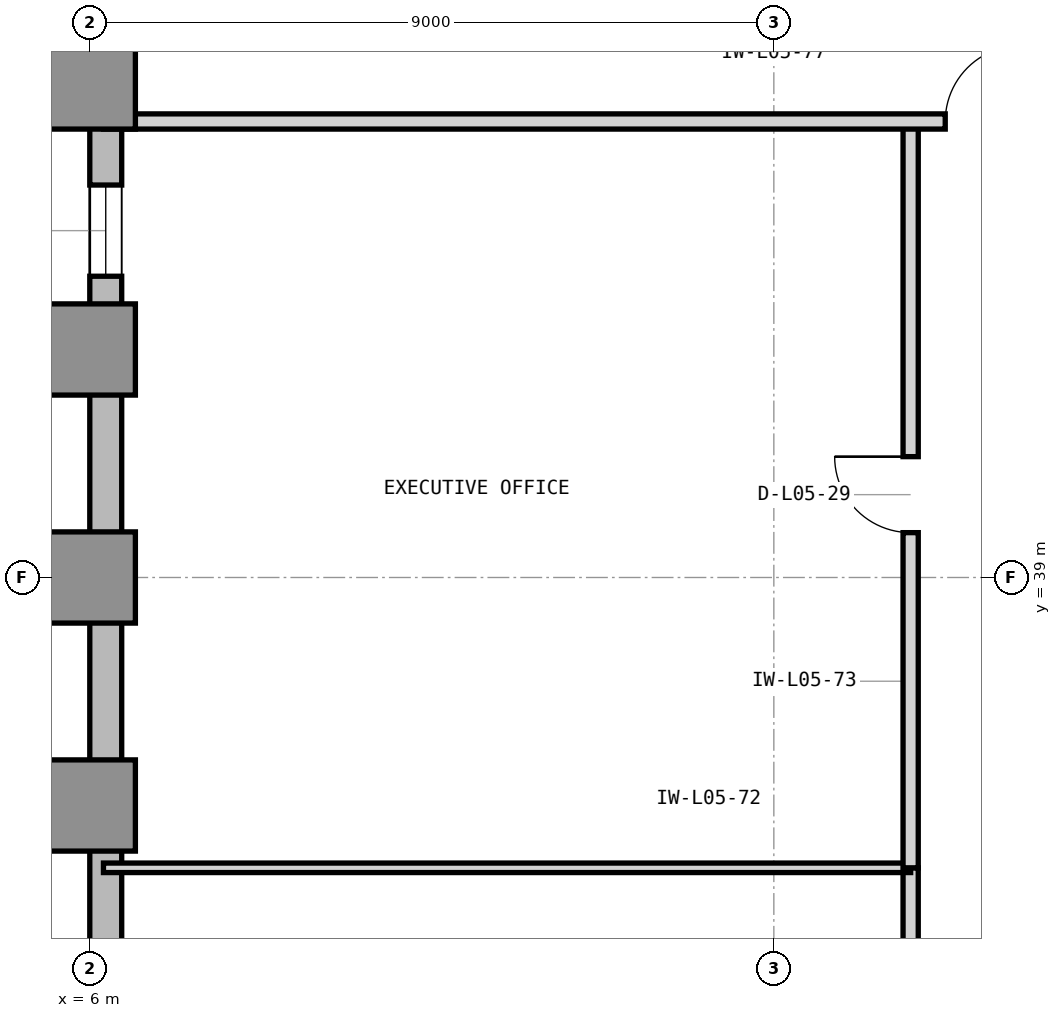
"""IFC4 building model, lengths in metres.
Left out: names, types, materials, properties, quantities, classifications, styles, units other than length and angle.
Written with IfcOpenShell. Run it as: python <this file> out.ifc"""

import sys

from ifc_helpers import new_model, si_unit, direction, frame, frame_2d, origin, origin_2d, place, context, subcontext, project, spatial, rectangle, extrude, element, fill, save


model = new_model("IFC4")
c1 = context("Model", 3, precision=1e-05, world=origin(), true_north=direction((0.0, 1.0)))
c2 = subcontext(c1, "Body", "Model", "MODEL_VIEW")
j1 = project(units=[si_unit("LENGTHUNIT", "METRE"), si_unit("PLANEANGLEUNIT", "RADIAN")], contexts=[c1])
p1 = place(None, origin())
s1 = spatial("IfcSite", under=j1, at=p1, CompositionType="ELEMENT")
p2 = place(p1, origin())
s2 = spatial("IfcBuilding", under=s1, at=p2, CompositionType="ELEMENT")
p3 = place(p2, frame((0.0, 0.0, 25.8)))
s3 = spatial("IfcBuildingStorey", under=s2, at=p3, CompositionType="ELEMENT", Elevation=25.8)
for number, where, z_axis, x_axis in (
    (1, (6.0, 36.0, 0.0), (0.0, 0.0, 1.0), (1.0, 0.0, 0.0)),
    (2, (6.0, 39.0, 0.0), (0.0, 0.0, 1.0), (1.0, 0.0, 0.0)),
    (3, (6.0, 42.0, 0.0), (0.0, 0.0, 1.0), (1.0, 0.0, 0.0)),
    (4, (6.0, 45.5, 0.0), (0.0, 0.0, 1.0), (1.0, 0.0, 0.0)),
):
    element("IfcColumn", number, at=place(p3, frame(where, z_axis=z_axis, x_axis=x_axis)), inside=s3, PredefinedType="COLUMN", context=c2, shape_type="SweptSolid", body=[
        extrude(rectangle(XDim=1.2, YDim=1.2, at=origin_2d()), origin(), (0.0, 0.0, 1.0), 4.2),
    ])
p4 = place(p3, frame((6.21, 49.4, 0.0), z_axis=(0.0, 0.0, 1.0), x_axis=(0.0, -1.0, 0.0)))
e5 = element("IfcWall", 5, at=p4, inside=s3, PredefinedType="STANDARD", context=c2, shape_type="SweptSolid", body=[
    extrude(rectangle(XDim=28.5, YDim=0.42, at=frame_2d((14.25, 0.0))), origin(), (0.0, 0.0, 1.0), 3.98),
])
p5 = place(p4, frame((15.225, 0.0, 0.85)))
e6 = element("IfcOpeningElement", 6, at=p5, cuts=e5, PredefinedType="OPENING", context=c2, shape_type="SweptSolid", body=[
    extrude(rectangle(XDim=2.8, YDim=2.45, at=frame_2d((1.4, 1.225))), frame((0.0, 0.22, 0.0), z_axis=(0.0, -1.0, 0.0), x_axis=(1.0, 0.0, 0.0)), (0.0, 0.0, 1.0), 0.44),
])
p6 = place(p4, frame((5.236, 0.0, 0.85)))
e7 = element("IfcOpeningElement", 7, at=p6, cuts=e5, PredefinedType="OPENING", context=c2, shape_type="SweptSolid", body=[
    extrude(rectangle(XDim=1.2, YDim=2.45, at=frame_2d((0.6, 1.225))), frame((0.0, 0.22, 0.0), z_axis=(0.0, -1.0, 0.0), x_axis=(1.0, 0.0, 0.0)), (0.0, 0.0, 1.0), 0.44),
])
p7 = place(p3, frame((16.8, 29.18, 0.0), z_axis=(0.0, 0.0, 1.0), x_axis=(0.0, 1.0, 0.0)))
e8 = element("IfcWall", 8, at=p7, inside=s3, PredefinedType="PARTITIONING", context=c2, shape_type="SweptSolid", body=[
    extrude(rectangle(XDim=6.0, YDim=0.2, at=frame_2d((3.0, 0.0))), origin(), (0.0, 0.0, 1.0), 3.97),
])
p8 = place(p7, frame((2.5, 0.0, 0.0)))
e9 = element("IfcOpeningElement", 9, at=p8, cuts=e8, PredefinedType="OPENING", context=c2, shape_type="SweptSolid", body=[
    extrude(rectangle(XDim=1.0, YDim=2.15, at=frame_2d((0.5, 1.075))), frame((0.0, 0.11, 0.0), z_axis=(0.0, -1.0, 0.0), x_axis=(1.0, 0.0, 0.0)), (0.0, 0.0, 1.0), 0.22),
])
p9 = place(p3, frame((6.18, 35.18, 0.0), z_axis=(0.0, 0.0, 1.0), x_axis=(1.0, 0.0, 0.0)))
e10 = element("IfcWall", 10, at=p9, inside=s3, PredefinedType="PARTITIONING", context=c2, shape_type="SweptSolid", body=[
    extrude(rectangle(XDim=10.62, YDim=0.125, at=frame_2d((5.31, 0.0))), origin(), (0.0, 0.0, 1.0), 3.97),
])
p10 = place(p3, frame((16.8, 35.18, 0.0), z_axis=(0.0, 0.0, 1.0), x_axis=(0.0, 1.0, 0.0)))
e11 = element("IfcWall", 11, at=p10, inside=s3, PredefinedType="PARTITIONING", context=c2, shape_type="SweptSolid", body=[
    extrude(rectangle(XDim=9.82, YDim=0.2, at=frame_2d((4.91, 0.0))), origin(), (0.0, 0.0, 1.0), 3.97),
])
p11 = place(p10, frame((4.41, 0.0, 0.0)))
e12 = element("IfcOpeningElement", 12, at=p11, cuts=e11, PredefinedType="OPENING", context=c2, shape_type="SweptSolid", body=[
    extrude(rectangle(XDim=1.0, YDim=2.15, at=frame_2d((0.5, 1.075))), frame((0.0, 0.11, 0.0), z_axis=(0.0, -1.0, 0.0), x_axis=(1.0, 0.0, 0.0)), (0.0, 0.0, 1.0), 0.22),
])
p12 = place(p3, frame((6.18, 45.0, 0.0), z_axis=(0.0, 0.0, 1.0), x_axis=(1.0, 0.0, 0.0)))
e13 = element("IfcWall", 13, at=p12, inside=s3, PredefinedType="PARTITIONING", context=c2, shape_type="SweptSolid", body=[
    extrude(rectangle(XDim=17.64, YDim=0.2, at=frame_2d((8.82, 0.0))), origin(), (0.0, 0.0, 1.0), 3.97),
])
p13 = place(p12, frame((11.075, 0.0, 0.0)))
e14 = element("IfcOpeningElement", 14, at=p13, cuts=e13, PredefinedType="OPENING", context=c2, shape_type="SweptSolid", body=[
    extrude(rectangle(XDim=1.0, YDim=2.15, at=frame_2d((0.5, 1.075))), frame((0.0, 0.11, 0.0), z_axis=(0.0, -1.0, 0.0), x_axis=(1.0, 0.0, 0.0)), (0.0, 0.0, 1.0), 0.22),
])
p14 = place(p11, origin())
e15 = element("IfcDoor", 15, at=p14, inside=s3, OperationType="SINGLE_SWING_RIGHT", PredefinedType="DOOR", context=c2, shape_type="SweptSolid", body=[
    extrude(rectangle(XDim=1.0, YDim=2.15, at=frame_2d((0.5, 1.075))), frame((0.0, 0.025, 0.0), z_axis=(0.0, -1.0, 0.0), x_axis=(1.0, 0.0, 0.0)), (0.0, 0.0, 1.0), 0.05),
])
fill(e12, e15)
p15 = place(p13, origin())
e16 = element("IfcDoor", 16, at=p15, inside=s3, OperationType="SINGLE_SWING_RIGHT", PredefinedType="DOOR", context=c2, shape_type="SweptSolid", body=[
    extrude(rectangle(XDim=1.0, YDim=2.15, at=frame_2d((0.5, 1.075))), frame((0.0, 0.025, 0.0), z_axis=(0.0, -1.0, 0.0), x_axis=(1.0, 0.0, 0.0)), (0.0, 0.0, 1.0), 0.05),
])
fill(e14, e16)
p16 = place(p6, origin())
e17 = element("IfcWindow", 17, at=p16, inside=s3, PartitioningType="SINGLE_PANEL", PredefinedType="WINDOW", context=c2, shape_type="SweptSolid", body=[
    extrude(rectangle(XDim=1.2, YDim=2.45, at=frame_2d((0.6, 1.225))), frame((0.0, 0.11, 0.0), z_axis=(0.0, -1.0, 0.0), x_axis=(1.0, 0.0, 0.0)), (0.0, 0.0, 1.0), 0.06),
])
fill(e7, e17)
save(model, sys.argv[1])
